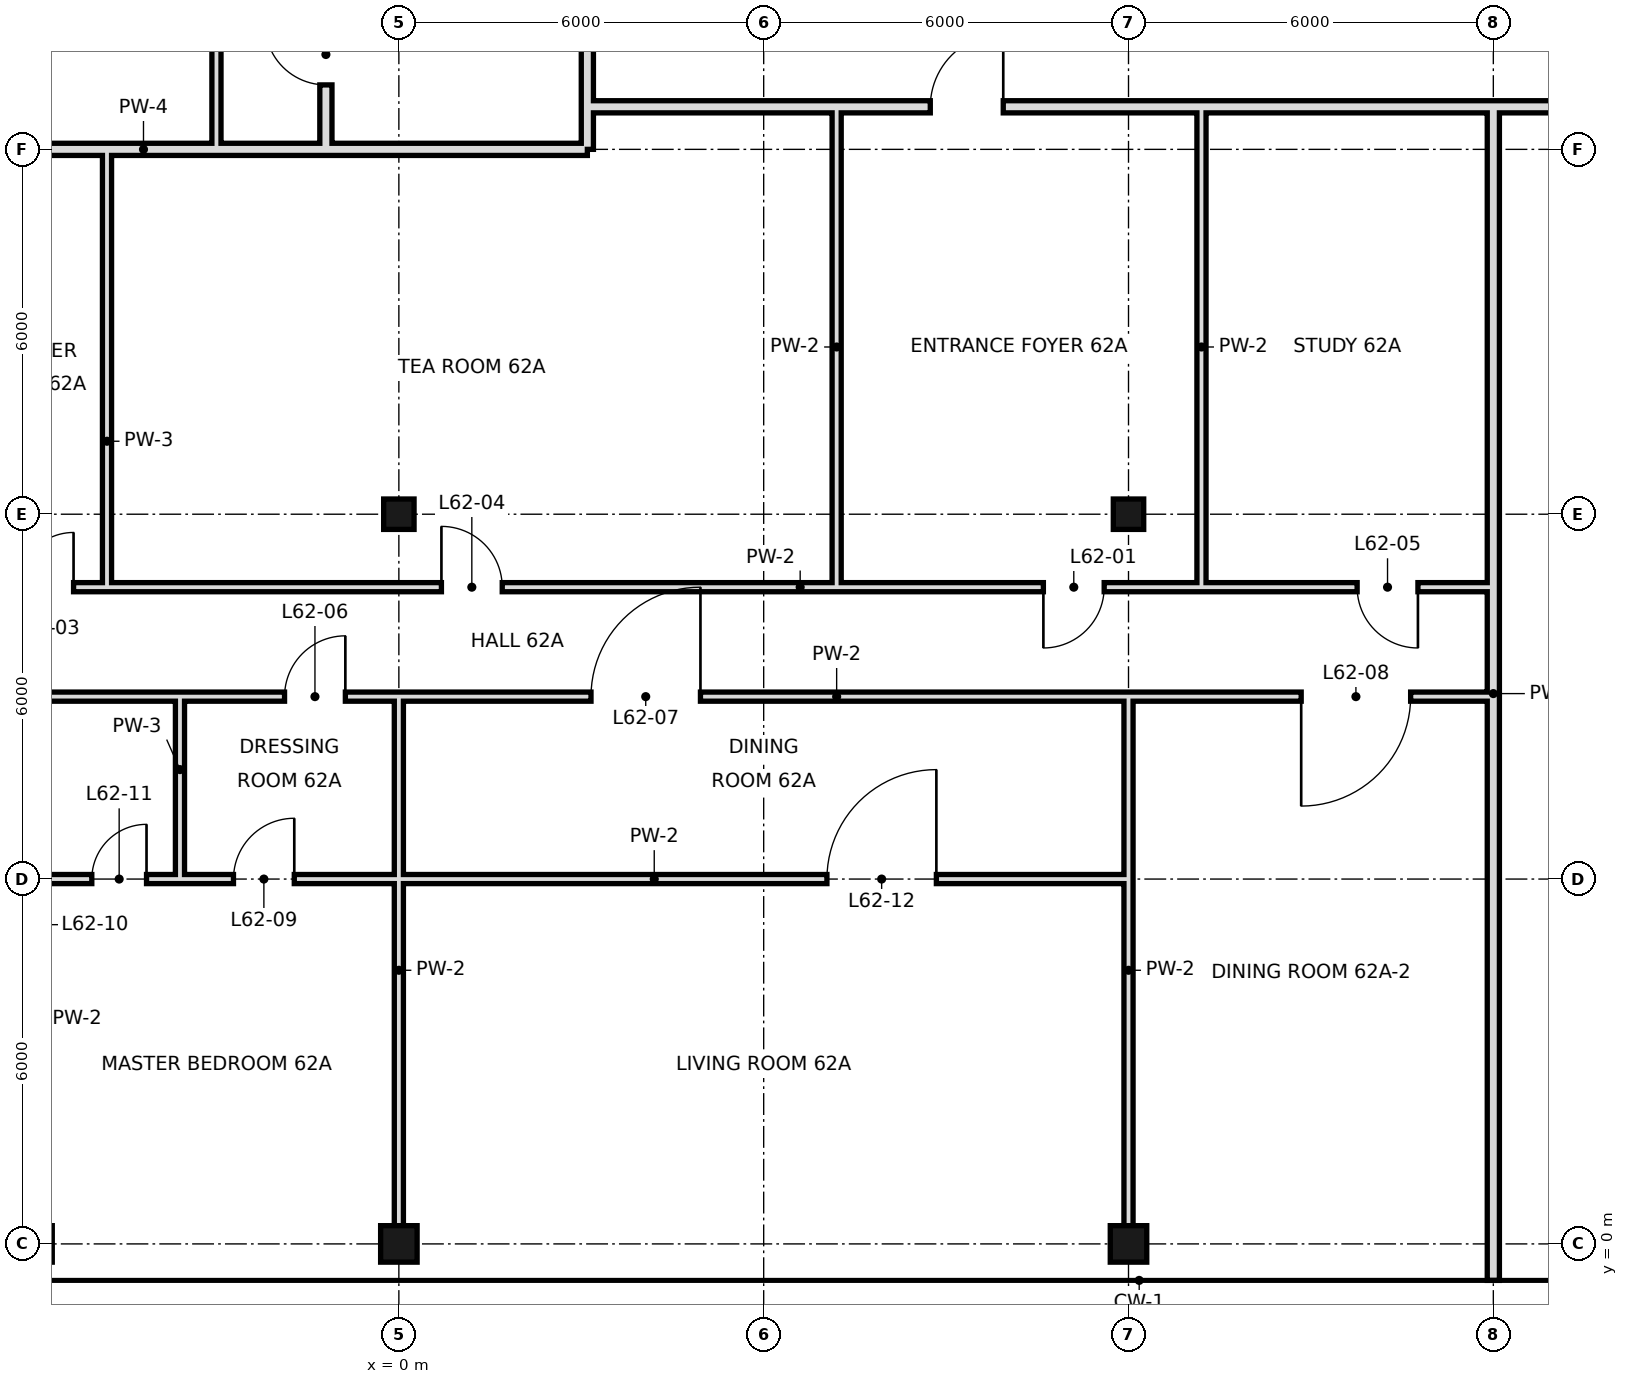
"""IFC4 building model, lengths in metres.
Left out: names, types, materials, properties, quantities, classifications, styles, units other than length and angle.
Written with IfcOpenShell. Run it as: python <this file> out.ifc"""

import sys

from ifc_helpers import new_model, si_unit, direction, frame, frame_2d, origin, origin_with_axes, origin_2d, place, context, subcontext, project, spatial, rectangle, hollow_rectangle, extrude, element, fill, save


model = new_model("IFC4")
c1 = context("Model", 3, precision=1e-05, world=origin(), true_north=direction((0.0, 1.0)))
c2 = subcontext(c1, "Body", "Model", "MODEL_VIEW")
j1 = project(units=[si_unit("LENGTHUNIT", "METRE"), si_unit("PLANEANGLEUNIT", "RADIAN")], contexts=[c1])
p1 = place(None, origin())
s1 = spatial("IfcSite", under=j1, at=p1, CompositionType="ELEMENT")
p2 = place(p1, origin())
s2 = spatial("IfcBuilding", under=s1, at=p2, CompositionType="ELEMENT")
p3 = place(p2, frame((0.0, 0.0, 263.0)))
s3 = spatial("IfcBuildingStorey", under=s2, at=p3, CompositionType="ELEMENT", Elevation=263.0)
p4 = place(p3, origin_with_axes())
e1 = element("IfcColumn", 1, at=p4, inside=s3, PredefinedType="COLUMN", context=c2, shape_type="SweptSolid", body=[
    extrude(hollow_rectangle(XDim=0.6, YDim=0.6, WallThickness=0.028, at=origin_2d()), origin(), (0.0, 0.0, 1.0), 3.6),
])
p5 = place(p3, frame((0.0, 12.0, 0.0), z_axis=(0.0, 0.0, 1.0), x_axis=(1.0, 0.0, 0.0)))
e2 = element("IfcColumn", 2, at=p5, inside=s3, PredefinedType="COLUMN", context=c2, shape_type="SweptSolid", body=[
    extrude(hollow_rectangle(XDim=0.5, YDim=0.5, WallThickness=0.025, at=origin_2d()), origin(), (0.0, 0.0, 1.0), 3.6),
])
p6 = place(p3, frame((12.0, 0.0, 0.0), z_axis=(0.0, 0.0, 1.0), x_axis=(1.0, 0.0, 0.0)))
e3 = element("IfcColumn", 3, at=p6, inside=s3, PredefinedType="COLUMN", context=c2, shape_type="SweptSolid", body=[
    extrude(hollow_rectangle(XDim=0.6, YDim=0.6, WallThickness=0.028, at=origin_2d()), origin(), (0.0, 0.0, 1.0), 3.6),
])
p7 = place(p3, frame((12.0, 12.0, 0.0), z_axis=(0.0, 0.0, 1.0), x_axis=(1.0, 0.0, 0.0)))
e4 = element("IfcColumn", 4, at=p7, inside=s3, PredefinedType="COLUMN", context=c2, shape_type="SweptSolid", body=[
    extrude(hollow_rectangle(XDim=0.5, YDim=0.5, WallThickness=0.025, at=origin_2d()), origin(), (0.0, 0.0, 1.0), 3.6),
])
p8 = place(p3, frame((-1.2, 18.0, 0.0), z_axis=(0.0, 0.0, 1.0), x_axis=(0.0, 1.0, 0.0)))
e5 = element("IfcWall", 5, at=p8, inside=s3, PredefinedType="SOLIDWALL", context=c2, shape_type="SweptSolid", body=[
    extrude(rectangle(XDim=4.2, YDim=0.2, at=frame_2d((2.1, 0.0))), origin(), (0.0, 0.0, 1.0), 2.72),
])
p9 = place(p8, frame((1.06, 0.0, 0.0)))
e6 = element("IfcOpeningElement", 6, at=p9, cuts=e5, PredefinedType="OPENING", context=c2, shape_type="SweptSolid", body=[
    extrude(rectangle(XDim=1.0, YDim=2.4, at=frame_2d((0.5, 1.2))), frame((0.0, 0.11, 0.0), z_axis=(0.0, -1.0, 0.0), x_axis=(1.0, 0.0, 0.0)), (0.0, 0.0, 1.0), 0.22),
])
p10 = place(p3, frame((-3.0, 18.0, 0.0), z_axis=(0.0, 0.0, 1.0), x_axis=(0.0, 1.0, 0.0)))
e7 = element("IfcWall", 7, at=p10, inside=s3, PredefinedType="PARTITIONING", context=c2, shape_type="SweptSolid", body=[
    extrude(rectangle(XDim=8.4, YDim=0.15, at=frame_2d((4.2, 0.0))), origin(), (0.0, 0.0, 1.0), 3.42),
])
p11 = place(p3, frame((-3.6, 6.0, 0.0), z_axis=(0.0, 0.0, 1.0), x_axis=(0.0, 1.0, 0.0)))
e8 = element("IfcWall", 8, at=p11, inside=s3, PredefinedType="PARTITIONING", context=c2, shape_type="SweptSolid", body=[
    extrude(rectangle(XDim=3.0, YDim=0.15, at=frame_2d((1.5, 0.0))), origin(), (0.0, 0.0, 1.0), 3.42),
])
p12 = place(p3, frame((-4.8, 10.8, 0.0), z_axis=(0.0, 0.0, 1.0), x_axis=(0.0, 1.0, 0.0)))
e9 = element("IfcWall", 9, at=p12, inside=s3, PredefinedType="PARTITIONING", context=c2, shape_type="SweptSolid", body=[
    extrude(rectangle(XDim=7.2, YDim=0.15, at=frame_2d((3.6, 0.0))), origin(), (0.0, 0.0, 1.0), 3.42),
])
for number, where, z_axis, x_axis in (
    (10, (0.0, 0.0, 0.0), (0.0, 0.0, 1.0), (0.0, 1.0, 0.0)),
    (11, (12.0, 0.0, 0.0), (0.0, 0.0, 1.0), (0.0, 1.0, 0.0)),
):
    element("IfcWall", number, at=place(p3, frame(where, z_axis=z_axis, x_axis=x_axis)), inside=s3, PredefinedType="PARTITIONING", context=c2, shape_type="SweptSolid", body=[
        extrude(rectangle(XDim=9.0, YDim=0.15, at=frame_2d((4.5, 0.0))), origin(), (0.0, 0.0, 1.0), 2.72),
    ])
p13 = place(p3, frame((13.2, 10.8, 0.0), z_axis=(0.0, 0.0, 1.0), x_axis=(0.0, 1.0, 0.0)))
e12 = element("IfcWall", 12, at=p13, inside=s3, PredefinedType="PARTITIONING", context=c2, shape_type="SweptSolid", body=[
    extrude(rectangle(XDim=7.9, YDim=0.15, at=frame_2d((3.95, 0.0))), origin(), (0.0, 0.0, 1.0), 3.42),
])
p14 = place(p3, frame((18.0, -0.6, 0.0), z_axis=(0.0, 0.0, 1.0), x_axis=(0.0, 1.0, 0.0)))
e13 = element("IfcWall", 13, at=p14, inside=s3, PredefinedType="SOLIDWALL", context=c2, shape_type="SweptSolid", body=[
    extrude(rectangle(XDim=19.3, YDim=0.2, at=frame_2d((9.65, 0.0))), origin(), (0.0, 0.0, 1.0), 2.72),
])
p15 = place(p3, frame((3.1, 18.0, 0.0), z_axis=(0.0, 0.0, 1.0), x_axis=(0.0, 1.0, 0.0)))
e14 = element("IfcWall", 14, at=p15, inside=s3, PredefinedType="SOLIDWALL", context=c2, shape_type="SweptSolid", body=[
    extrude(rectangle(XDim=4.2, YDim=0.2, at=frame_2d((2.1, 0.0))), origin(), (0.0, 0.0, 1.0), 2.97),
])
p16 = place(p3, frame((7.2, 10.8, 0.0), z_axis=(0.0, 0.0, 1.0), x_axis=(0.0, 1.0, 0.0)))
e15 = element("IfcWall", 15, at=p16, inside=s3, PredefinedType="PARTITIONING", context=c2, shape_type="SweptSolid", body=[
    extrude(rectangle(XDim=7.9, YDim=0.15, at=frame_2d((3.95, 0.0))), origin(), (0.0, 0.0, 1.0), 3.42),
])
p17 = place(p3, frame((-4.8, 10.8, 0.0), z_axis=(0.0, 0.0, 1.0), x_axis=(1.0, 0.0, 0.0)))
e16 = element("IfcWall", 16, at=p17, inside=s3, PredefinedType="PARTITIONING", context=c2, shape_type="SweptSolid", body=[
    extrude(rectangle(XDim=22.8, YDim=0.15, at=frame_2d((11.4, 0.0))), origin(), (0.0, 0.0, 1.0), 3.42),
])
p18 = place(p17, frame((15.4, 0.0, 0.0)))
e17 = element("IfcOpeningElement", 17, at=p18, cuts=e16, PredefinedType="OPENING", context=c2, shape_type="SweptSolid", body=[
    extrude(rectangle(XDim=1.0, YDim=2.4, at=frame_2d((0.5, 1.2))), frame((0.0, 0.085, 0.0), z_axis=(0.0, -1.0, 0.0), x_axis=(1.0, 0.0, 0.0)), (0.0, 0.0, 1.0), 0.17),
])
p19 = place(p17, frame((5.5, 0.0, 0.0)))
e18 = element("IfcOpeningElement", 18, at=p19, cuts=e16, PredefinedType="OPENING", context=c2, shape_type="SweptSolid", body=[
    extrude(rectangle(XDim=1.0, YDim=2.4, at=frame_2d((0.5, 1.2))), frame((0.0, 0.085, 0.0), z_axis=(0.0, -1.0, 0.0), x_axis=(1.0, 0.0, 0.0)), (0.0, 0.0, 1.0), 0.17),
])
p20 = place(p17, frame((20.56, 0.0, 0.0)))
e19 = element("IfcOpeningElement", 19, at=p20, cuts=e16, PredefinedType="OPENING", context=c2, shape_type="SweptSolid", body=[
    extrude(rectangle(XDim=1.0, YDim=2.4, at=frame_2d((0.5, 1.2))), frame((0.0, 0.085, 0.0), z_axis=(0.0, -1.0, 0.0), x_axis=(1.0, 0.0, 0.0)), (0.0, 0.0, 1.0), 0.17),
])
p21 = place(p3, frame((-7.2, 10.8, 0.0), z_axis=(0.0, 0.0, 1.0), x_axis=(1.0, 0.0, 0.0)))
e20 = element("IfcWall", 20, at=p21, inside=s3, PredefinedType="PARTITIONING", context=c2, shape_type="SweptSolid", body=[
    extrude(rectangle(XDim=2.4, YDim=0.15, at=frame_2d((1.2, 0.0))), origin(), (0.0, 0.0, 1.0), 3.42),
])
p22 = place(p21, frame((0.95, 0.0, 0.0)))
e21 = element("IfcOpeningElement", 21, at=p22, cuts=e20, PredefinedType="OPENING", context=c2, shape_type="SweptSolid", body=[
    extrude(rectangle(XDim=0.9, YDim=2.4, at=frame_2d((0.45, 1.2))), frame((0.0, 0.085, 0.0), z_axis=(0.0, -1.0, 0.0), x_axis=(1.0, 0.0, 0.0)), (0.0, 0.0, 1.0), 0.17),
])
p23 = place(p3, frame((-1.2, 18.0, 0.0), z_axis=(0.0, 0.0, 1.0), x_axis=(1.0, 0.0, 0.0)))
e22 = element("IfcWall", 22, at=p23, inside=s3, PredefinedType="SOLIDWALL", context=c2, shape_type="SweptSolid", body=[
    extrude(rectangle(XDim=4.3, YDim=0.2, at=frame_2d((2.15, 0.0))), origin(), (0.0, 0.0, 1.0), 2.72),
])
p24 = place(p3, frame((-7.2, 18.0, 0.0), z_axis=(0.0, 0.0, 1.0), x_axis=(1.0, 0.0, 0.0)))
e23 = element("IfcWall", 23, at=p24, inside=s3, PredefinedType="SOLIDWALL", context=c2, shape_type="SweptSolid", body=[
    extrude(rectangle(XDim=6.0, YDim=0.2, at=frame_2d((3.0, 0.0))), origin(), (0.0, 0.0, 1.0), 2.72),
])
p25 = place(p3, frame((3.1, 18.7, 0.0), z_axis=(0.0, 0.0, 1.0), x_axis=(1.0, 0.0, 0.0)))
e24 = element("IfcWall", 24, at=p25, inside=s3, PredefinedType="SOLIDWALL", context=c2, shape_type="SweptSolid", body=[
    extrude(rectangle(XDim=41.8, YDim=0.2, at=frame_2d((20.9, 0.0))), origin(), (0.0, 0.0, 1.0), 2.72),
])
p26 = place(p25, frame((5.64, 0.0, 0.0)))
e25 = element("IfcOpeningElement", 25, at=p26, cuts=e24, PredefinedType="OPENING", context=c2, shape_type="SweptSolid", body=[
    extrude(rectangle(XDim=1.2, YDim=2.4, at=frame_2d((0.6, 1.2))), frame((0.0, 0.11, 0.0), z_axis=(0.0, -1.0, 0.0), x_axis=(1.0, 0.0, 0.0)), (0.0, 0.0, 1.0), 0.22),
])
p27 = place(p25, frame((22.53, 0.0, 0.0)))
e26 = element("IfcOpeningElement", 26, at=p27, cuts=e24, PredefinedType="OPENING", context=c2, shape_type="SweptSolid", body=[
    extrude(rectangle(XDim=1.8, YDim=2.4, at=frame_2d((0.9, 1.2))), frame((0.0, 0.11, 0.0), z_axis=(0.0, -1.0, 0.0), x_axis=(1.0, 0.0, 0.0)), (0.0, 0.0, 1.0), 0.22),
])
p28 = place(p3, frame((-3.6, 6.0, 0.0), z_axis=(0.0, 0.0, 1.0), x_axis=(1.0, 0.0, 0.0)))
e27 = element("IfcWall", 27, at=p28, inside=s3, PredefinedType="PARTITIONING", context=c2, shape_type="SweptSolid", body=[
    extrude(rectangle(XDim=15.6, YDim=0.15, at=frame_2d((7.8, 0.0))), origin(), (0.0, 0.0, 1.0), 2.72),
])
p29 = place(p28, frame((0.88, 0.0, 0.0)))
e28 = element("IfcOpeningElement", 28, at=p29, cuts=e27, PredefinedType="OPENING", context=c2, shape_type="SweptSolid", body=[
    extrude(rectangle(XDim=1.0, YDim=2.4, at=frame_2d((0.5, 1.2))), frame((0.0, 0.085, 0.0), z_axis=(0.0, -1.0, 0.0), x_axis=(1.0, 0.0, 0.0)), (0.0, 0.0, 1.0), 0.17),
])
p30 = place(p28, frame((10.64, 0.0, 0.0)))
e29 = element("IfcOpeningElement", 29, at=p30, cuts=e27, PredefinedType="OPENING", context=c2, shape_type="SweptSolid", body=[
    extrude(rectangle(XDim=1.8, YDim=2.4, at=frame_2d((0.9, 1.2))), frame((0.0, 0.085, 0.0), z_axis=(0.0, -1.0, 0.0), x_axis=(1.0, 0.0, 0.0)), (0.0, 0.0, 1.0), 0.17),
])
p31 = place(p3, frame((-12.0, 6.0, 0.0), z_axis=(0.0, 0.0, 1.0), x_axis=(1.0, 0.0, 0.0)))
e30 = element("IfcWall", 30, at=p31, inside=s3, PredefinedType="PARTITIONING", context=c2, shape_type="SweptSolid", body=[
    extrude(rectangle(XDim=8.4, YDim=0.15, at=frame_2d((4.2, 0.0))), origin(), (0.0, 0.0, 1.0), 2.72),
])
p32 = place(p31, frame((6.95, 0.0, 0.0)))
e31 = element("IfcOpeningElement", 31, at=p32, cuts=e30, PredefinedType="OPENING", context=c2, shape_type="SweptSolid", body=[
    extrude(rectangle(XDim=0.9, YDim=2.4, at=frame_2d((0.45, 1.2))), frame((0.0, 0.085, 0.0), z_axis=(0.0, -1.0, 0.0), x_axis=(1.0, 0.0, 0.0)), (0.0, 0.0, 1.0), 0.17),
])
p33 = place(p3, frame((-3.6, 9.0, 0.0), z_axis=(0.0, 0.0, 1.0), x_axis=(1.0, 0.0, 0.0)))
e32 = element("IfcWall", 32, at=p33, inside=s3, PredefinedType="PARTITIONING", context=c2, shape_type="SweptSolid", body=[
    extrude(rectangle(XDim=21.6, YDim=0.15, at=frame_2d((10.8, 0.0))), origin(), (0.0, 0.0, 1.0), 3.42),
])
p34 = place(p33, frame((1.72, 0.0, 0.0)))
e33 = element("IfcOpeningElement", 33, at=p34, cuts=e32, PredefinedType="OPENING", context=c2, shape_type="SweptSolid", body=[
    extrude(rectangle(XDim=1.0, YDim=2.4, at=frame_2d((0.5, 1.2))), frame((0.0, 0.085, 0.0), z_axis=(0.0, -1.0, 0.0), x_axis=(1.0, 0.0, 0.0)), (0.0, 0.0, 1.0), 0.17),
])
p35 = place(p33, frame((6.76, 0.0, 0.0)))
e34 = element("IfcOpeningElement", 34, at=p35, cuts=e32, PredefinedType="OPENING", context=c2, shape_type="SweptSolid", body=[
    extrude(rectangle(XDim=1.8, YDim=2.4, at=frame_2d((0.9, 1.2))), frame((0.0, 0.085, 0.0), z_axis=(0.0, -1.0, 0.0), x_axis=(1.0, 0.0, 0.0)), (0.0, 0.0, 1.0), 0.17),
])
p36 = place(p33, frame((18.44, 0.0, 0.0)))
e35 = element("IfcOpeningElement", 35, at=p36, cuts=e32, PredefinedType="OPENING", context=c2, shape_type="SweptSolid", body=[
    extrude(rectangle(XDim=1.8, YDim=2.4, at=frame_2d((0.9, 1.2))), frame((0.0, 0.085, 0.0), z_axis=(0.0, -1.0, 0.0), x_axis=(1.0, 0.0, 0.0)), (0.0, 0.0, 1.0), 0.17),
])
p37 = place(p3, frame((-12.6, 9.0, 0.0), z_axis=(0.0, 0.0, 1.0), x_axis=(1.0, 0.0, 0.0)))
e36 = element("IfcWall", 36, at=p37, inside=s3, PredefinedType="PARTITIONING", context=c2, shape_type="SweptSolid", body=[
    extrude(rectangle(XDim=9.0, YDim=0.15, at=frame_2d((4.5, 0.0))), origin(), (0.0, 0.0, 1.0), 3.42),
])
p38 = place(p18, frame((1.0, 0.0, 0.0), z_axis=(0.0, 0.0, 1.0), x_axis=(-1.0, 0.0, 0.0)))
e37 = element("IfcDoor", 37, at=p38, inside=s3, OperationType="SINGLE_SWING_RIGHT", PredefinedType="DOOR", context=c2, shape_type="SweptSolid", body=[
    extrude(rectangle(XDim=1.0, YDim=2.4, at=frame_2d((0.5, 1.2))), frame((0.0, 0.025, 0.0), z_axis=(0.0, -1.0, 0.0), x_axis=(1.0, 0.0, 0.0)), (0.0, 0.0, 1.0), 0.05),
])
fill(e17, e37)
p39 = place(p22, frame((0.9, 0.0, 0.0), z_axis=(0.0, 0.0, 1.0), x_axis=(-1.0, 0.0, 0.0)))
e38 = element("IfcDoor", 38, at=p39, inside=s3, OperationType="SINGLE_SWING_LEFT", PredefinedType="DOOR", context=c2, shape_type="SweptSolid", body=[
    extrude(rectangle(XDim=0.9, YDim=2.4, at=frame_2d((0.45, 1.2))), frame((0.0, 0.025, 0.0), z_axis=(0.0, -1.0, 0.0), x_axis=(1.0, 0.0, 0.0)), (0.0, 0.0, 1.0), 0.05),
])
fill(e21, e38)
p40 = place(p19, origin())
e39 = element("IfcDoor", 39, at=p40, inside=s3, OperationType="SINGLE_SWING_LEFT", PredefinedType="DOOR", context=c2, shape_type="SweptSolid", body=[
    extrude(rectangle(XDim=1.0, YDim=2.4, at=frame_2d((0.5, 1.2))), frame((0.0, 0.025, 0.0), z_axis=(0.0, -1.0, 0.0), x_axis=(1.0, 0.0, 0.0)), (0.0, 0.0, 1.0), 0.05),
])
fill(e18, e39)
p41 = place(p20, origin())
e40 = element("IfcDoor", 40, at=p41, inside=s3, OperationType="SINGLE_SWING_RIGHT", PredefinedType="DOOR", context=c2, shape_type="SweptSolid", body=[
    extrude(rectangle(XDim=1.0, YDim=2.4, at=frame_2d((0.5, 1.2))), frame((0.0, 0.025, 0.0), z_axis=(0.0, -1.0, 0.0), x_axis=(1.0, 0.0, 0.0)), (0.0, 0.0, 1.0), 0.05),
])
fill(e19, e40)
p42 = place(p34, frame((1.0, 0.0, 0.0), z_axis=(0.0, 0.0, 1.0), x_axis=(-1.0, 0.0, 0.0)))
e41 = element("IfcDoor", 41, at=p42, inside=s3, OperationType="SINGLE_SWING_LEFT", PredefinedType="DOOR", context=c2, shape_type="SweptSolid", body=[
    extrude(rectangle(XDim=1.0, YDim=2.4, at=frame_2d((0.5, 1.2))), frame((0.0, 0.025, 0.0), z_axis=(0.0, -1.0, 0.0), x_axis=(1.0, 0.0, 0.0)), (0.0, 0.0, 1.0), 0.05),
])
fill(e33, e41)
p43 = place(p35, frame((1.8, 0.0, 0.0), z_axis=(0.0, 0.0, 1.0), x_axis=(-1.0, 0.0, 0.0)))
e42 = element("IfcDoor", 42, at=p43, inside=s3, OperationType="SINGLE_SWING_LEFT", PredefinedType="DOOR", context=c2, shape_type="SweptSolid", body=[
    extrude(rectangle(XDim=1.8, YDim=2.4, at=frame_2d((0.9, 1.2))), frame((0.0, 0.025, 0.0), z_axis=(0.0, -1.0, 0.0), x_axis=(1.0, 0.0, 0.0)), (0.0, 0.0, 1.0), 0.05),
])
fill(e34, e42)
p44 = place(p36, frame((1.8, 0.0, 0.0), z_axis=(0.0, 0.0, 1.0), x_axis=(-1.0, 0.0, 0.0)))
e43 = element("IfcDoor", 43, at=p44, inside=s3, OperationType="SINGLE_SWING_RIGHT", PredefinedType="DOOR", context=c2, shape_type="SweptSolid", body=[
    extrude(rectangle(XDim=1.8, YDim=2.4, at=frame_2d((0.9, 1.2))), frame((0.0, 0.025, 0.0), z_axis=(0.0, -1.0, 0.0), x_axis=(1.0, 0.0, 0.0)), (0.0, 0.0, 1.0), 0.05),
])
fill(e35, e43)
p45 = place(p29, frame((1.0, 0.0, 0.0), z_axis=(0.0, 0.0, 1.0), x_axis=(-1.0, 0.0, 0.0)))
e44 = element("IfcDoor", 44, at=p45, inside=s3, OperationType="SINGLE_SWING_LEFT", PredefinedType="DOOR", context=c2, shape_type="SweptSolid", body=[
    extrude(rectangle(XDim=1.0, YDim=2.4, at=frame_2d((0.5, 1.2))), frame((0.0, 0.025, 0.0), z_axis=(0.0, -1.0, 0.0), x_axis=(1.0, 0.0, 0.0)), (0.0, 0.0, 1.0), 0.05),
])
fill(e28, e44)
p46 = place(p32, frame((0.9, 0.0, 0.0), z_axis=(0.0, 0.0, 1.0), x_axis=(-1.0, 0.0, 0.0)))
e45 = element("IfcDoor", 45, at=p46, inside=s3, OperationType="SINGLE_SWING_LEFT", PredefinedType="DOOR", context=c2, shape_type="SweptSolid", body=[
    extrude(rectangle(XDim=0.9, YDim=2.4, at=frame_2d((0.45, 1.2))), frame((0.0, 0.025, 0.0), z_axis=(0.0, -1.0, 0.0), x_axis=(1.0, 0.0, 0.0)), (0.0, 0.0, 1.0), 0.05),
])
fill(e31, e45)
p47 = place(p30, frame((1.8, 0.0, 0.0), z_axis=(0.0, 0.0, 1.0), x_axis=(-1.0, 0.0, 0.0)))
e46 = element("IfcDoor", 46, at=p47, inside=s3, OperationType="SINGLE_SWING_LEFT", PredefinedType="DOOR", context=c2, shape_type="SweptSolid", body=[
    extrude(rectangle(XDim=1.8, YDim=2.4, at=frame_2d((0.9, 1.2))), frame((0.0, 0.025, 0.0), z_axis=(0.0, -1.0, 0.0), x_axis=(1.0, 0.0, 0.0)), (0.0, 0.0, 1.0), 0.05),
])
fill(e29, e46)
p48 = place(p9, frame((1.0, 0.0, 0.0), z_axis=(0.0, 0.0, 1.0), x_axis=(-1.0, 0.0, 0.0)))
e47 = element("IfcDoor", 47, at=p48, inside=s3, OperationType="SINGLE_SWING_LEFT", PredefinedType="DOOR", context=c2, shape_type="SweptSolid", body=[
    extrude(rectangle(XDim=1.0, YDim=2.4, at=frame_2d((0.5, 1.2))), frame((0.0, 0.025, 0.0), z_axis=(0.0, -1.0, 0.0), x_axis=(1.0, 0.0, 0.0)), (0.0, 0.0, 1.0), 0.05),
])
fill(e6, e47)
p49 = place(p26, frame((1.2, 0.0, 0.0), z_axis=(0.0, 0.0, 1.0), x_axis=(-1.0, 0.0, 0.0)))
e48 = element("IfcDoor", 48, at=p49, inside=s3, OperationType="SINGLE_SWING_LEFT", PredefinedType="DOOR", context=c2, shape_type="SweptSolid", body=[
    extrude(rectangle(XDim=1.2, YDim=2.4, at=frame_2d((0.6, 1.2))), frame((0.0, 0.025, 0.0), z_axis=(0.0, -1.0, 0.0), x_axis=(1.0, 0.0, 0.0)), (0.0, 0.0, 1.0), 0.05),
])
fill(e25, e48)
save(model, sys.argv[1])
